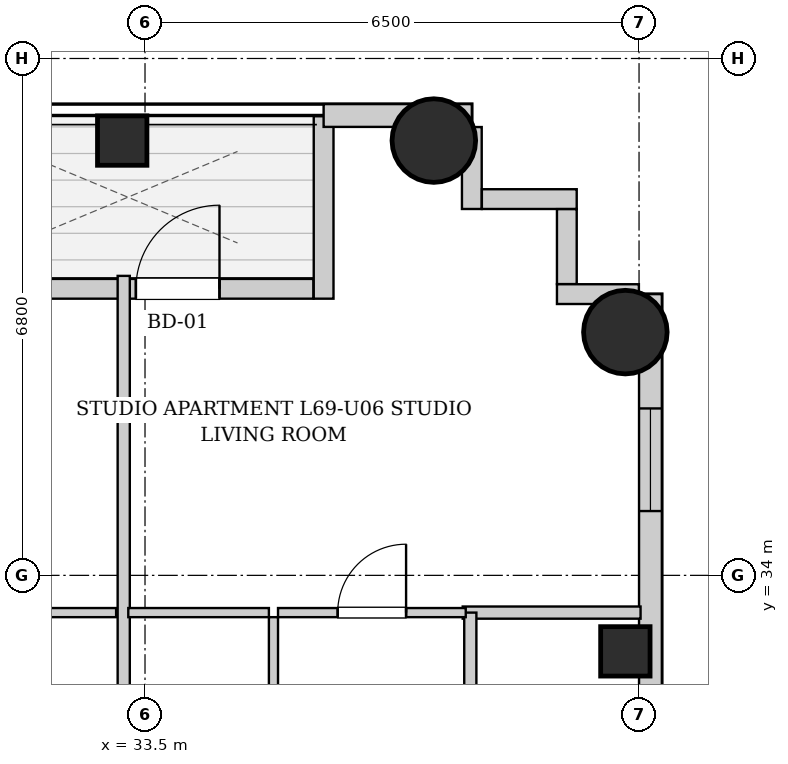
"""IFC4 building model, lengths in metres.
Left out: names, types, materials, properties, quantities, classifications, styles, units other than length and angle.
Written with IfcOpenShell. Run it as: python <this file> out.ifc"""

import sys

from ifc_helpers import new_model, si_unit, direction, frame, frame_2d, origin, origin_2d, place, context, subcontext, project, spatial, rectangle, circle, extrude, element, fill, save


model = new_model("IFC4")
c1 = context("Model", 3, precision=1e-05, world=origin(), true_north=direction((0.0, 1.0)))
c2 = subcontext(c1, "Body", "Model", "MODEL_VIEW")
j1 = project(units=[si_unit("LENGTHUNIT", "METRE"), si_unit("PLANEANGLEUNIT", "RADIAN")], contexts=[c1])
p1 = place(None, origin())
s1 = spatial("IfcSite", under=j1, at=p1, CompositionType="ELEMENT")
p2 = place(p1, origin())
s2 = spatial("IfcBuilding", under=s1, at=p2, CompositionType="ELEMENT")
p3 = place(p2, frame((0.0, 0.0, 237.7)))
s3 = spatial("IfcBuildingStorey", under=s2, at=p3, CompositionType="ELEMENT", Elevation=237.7)
p4 = place(p3, frame((33.2, 39.72, 0.0), z_axis=(0.0, 0.0, 1.0), x_axis=(1.0, 0.0, 0.0)))
e1 = element("IfcColumn", 1, at=p4, inside=s3, PredefinedType="COLUMN", context=c2, shape_type="SweptSolid", body=[
    extrude(rectangle(XDim=0.65, YDim=0.65, at=origin_2d()), origin(), (0.0, 0.0, 1.0), 3.4),
])
p5 = place(p3, frame((37.3, 39.72, 0.0), z_axis=(0.0, 0.0, 1.0), x_axis=(1.0, 0.0, 0.0)))
e2 = element("IfcColumn", 2, at=p5, inside=s3, PredefinedType="COLUMN", context=c2, shape_type="SweptSolid", body=[
    extrude(circle(Radius=0.55, at=origin_2d()), origin(), (0.0, 0.0, 1.0), 3.4),
])
p6 = place(p3, frame((39.82, 33.0, 0.0), z_axis=(0.0, 0.0, 1.0), x_axis=(1.0, 0.0, 0.0)))
e3 = element("IfcColumn", 3, at=p6, inside=s3, PredefinedType="COLUMN", context=c2, shape_type="SweptSolid", body=[
    extrude(rectangle(XDim=0.65, YDim=0.65, at=origin_2d()), origin(), (0.0, 0.0, 1.0), 3.4),
])
p7 = place(p3, frame((39.82, 37.2, 0.0), z_axis=(0.0, 0.0, 1.0), x_axis=(1.0, 0.0, 0.0)))
e4 = element("IfcColumn", 4, at=p7, inside=s3, PredefinedType="COLUMN", context=c2, shape_type="SweptSolid", body=[
    extrude(circle(Radius=0.55, at=origin_2d()), origin(), (0.0, 0.0, 1.0), 3.4),
])
p8 = place(p3, frame((30.834, 37.77, 0.0), z_axis=(0.0, 0.0, 1.0), x_axis=(1.0, 0.0, 0.0)))
e5 = element("IfcWall", 5, at=p8, inside=s3, PredefinedType="SOLIDWALL", context=c2, shape_type="SweptSolid", body=[
    extrude(rectangle(XDim=4.882, YDim=0.26, at=frame_2d((2.441, 0.0))), origin(), (0.0, 0.0, 1.0), 3.14),
])
p9 = place(p8, frame((2.546, 0.0, 0.0)))
e6 = element("IfcOpeningElement", 6, at=p9, cuts=e5, PredefinedType="OPENING", context=c2, shape_type="SweptSolid", body=[
    extrude(rectangle(XDim=1.1, YDim=2.0, at=frame_2d((0.55, 1.0))), frame((0.0, 0.14, 0.0), z_axis=(0.0, -1.0, 0.0), x_axis=(1.0, 0.0, 0.0)), (0.0, 0.0, 1.0), 0.28),
])
p10 = place(p3, frame((35.85, 37.64, 0.0), z_axis=(0.0, 0.0, 1.0), x_axis=(0.0, 1.0, 0.0)))
e7 = element("IfcWall", 7, at=p10, inside=s3, PredefinedType="SOLIDWALL", context=c2, shape_type="SweptSolid", body=[
    extrude(rectangle(XDim=2.4, YDim=0.26, at=frame_2d((1.2, 0.0))), origin(), (0.0, 0.0, 1.0), 3.14),
])
p11 = place(p3, frame((35.85, 40.05, 0.0), z_axis=(0.0, 0.0, 1.0), x_axis=(1.0, 0.0, 0.0)))
e8 = element("IfcWall", 8, at=p11, inside=s3, PredefinedType="SOLIDWALL", context=c2, shape_type="SweptSolid", body=[
    extrude(rectangle(XDim=1.95, YDim=0.3, at=frame_2d((0.975, 0.0))), origin(), (0.0, 0.0, 1.0), 3.14),
])
p12 = place(p3, frame((40.15, 37.7, 0.0), z_axis=(0.0, 0.0, 1.0), x_axis=(0.0, -1.0, 0.0)))
e9 = element("IfcWall", 9, at=p12, inside=s3, PredefinedType="SOLIDWALL", context=c2, shape_type="SweptSolid", body=[
    extrude(rectangle(XDim=31.4, YDim=0.3, at=frame_2d((15.7, 0.0))), origin(), (0.0, 0.0, 1.0), 3.14),
])
p13 = place(p12, frame((28.546, 0.0, 0.55)))
e10 = element("IfcOpeningElement", 10, at=p13, cuts=e9, PredefinedType="OPENING", context=c2, shape_type="SweptSolid", body=[
    extrude(rectangle(XDim=1.35, YDim=1.2, at=frame_2d((0.675, 0.6))), frame((0.0, 0.16, 0.0), z_axis=(0.0, -1.0, 0.0), x_axis=(1.0, 0.0, 0.0)), (0.0, 0.0, 1.0), 0.32),
])
p14 = place(p12, frame((1.504, 0.0, 0.55)))
e11 = element("IfcOpeningElement", 11, at=p14, cuts=e9, PredefinedType="OPENING", context=c2, shape_type="SweptSolid", body=[
    extrude(rectangle(XDim=1.35, YDim=1.2, at=frame_2d((0.675, 0.6))), frame((0.0, 0.16, 0.0), z_axis=(0.0, -1.0, 0.0), x_axis=(1.0, 0.0, 0.0)), (0.0, 0.0, 1.0), 0.32),
])
p15 = place(p12, frame((18.2, 0.0, 0.55)))
e12 = element("IfcOpeningElement", 12, at=p15, cuts=e9, PredefinedType="OPENING", context=c2, shape_type="SweptSolid", body=[
    extrude(rectangle(XDim=1.35, YDim=1.2, at=frame_2d((0.675, 0.6))), frame((0.0, 0.16, 0.0), z_axis=(0.0, -1.0, 0.0), x_axis=(1.0, 0.0, 0.0)), (0.0, 0.0, 1.0), 0.32),
])
p16 = place(p12, frame((19.81, 0.0, 0.55)))
e13 = element("IfcOpeningElement", 13, at=p16, cuts=e9, PredefinedType="OPENING", context=c2, shape_type="SweptSolid", body=[
    extrude(rectangle(XDim=1.35, YDim=1.2, at=frame_2d((0.675, 0.6))), frame((0.0, 0.16, 0.0), z_axis=(0.0, -1.0, 0.0), x_axis=(1.0, 0.0, 0.0)), (0.0, 0.0, 1.0), 0.32),
])
p17 = place(p12, frame((11.043, 0.0, 0.55)))
e14 = element("IfcOpeningElement", 14, at=p17, cuts=e9, PredefinedType="OPENING", context=c2, shape_type="SweptSolid", body=[
    extrude(rectangle(XDim=1.35, YDim=1.2, at=frame_2d((0.675, 0.6))), frame((0.0, 0.16, 0.0), z_axis=(0.0, -1.0, 0.0), x_axis=(1.0, 0.0, 0.0)), (0.0, 0.0, 1.0), 0.32),
])
p18 = place(p12, frame((9.185, 0.0, 0.55)))
e15 = element("IfcOpeningElement", 15, at=p18, cuts=e9, PredefinedType="OPENING", context=c2, shape_type="SweptSolid", body=[
    extrude(rectangle(XDim=1.35, YDim=1.2, at=frame_2d((0.675, 0.6))), frame((0.0, 0.16, 0.0), z_axis=(0.0, -1.0, 0.0), x_axis=(1.0, 0.0, 0.0)), (0.0, 0.0, 1.0), 0.32),
])
p19 = place(p3, frame((37.8, 39.898, 0.0), z_axis=(0.0, 0.0, 1.0), x_axis=(0.0, -1.0, 0.0)))
e16 = element("IfcWall", 16, at=p19, inside=s3, PredefinedType="SOLIDWALL", context=c2, shape_type="SweptSolid", body=[
    extrude(rectangle(XDim=1.078, YDim=0.26, at=frame_2d((0.539, 0.0))), origin(), (0.0, 0.0, 1.0), 3.14),
])
p20 = place(p3, frame((37.932, 38.95, 0.0), z_axis=(0.0, 0.0, 1.0), x_axis=(1.0, 0.0, 0.0)))
e17 = element("IfcWall", 17, at=p20, inside=s3, PredefinedType="SOLIDWALL", context=c2, shape_type="SweptSolid", body=[
    extrude(rectangle(XDim=1.248, YDim=0.26, at=frame_2d((0.624, 0.0))), origin(), (0.0, 0.0, 1.0), 3.14),
])
p21 = place(p3, frame((39.05, 38.818, 0.0), z_axis=(0.0, 0.0, 1.0), x_axis=(0.0, -1.0, 0.0)))
e18 = element("IfcWall", 18, at=p21, inside=s3, PredefinedType="SOLIDWALL", context=c2, shape_type="SweptSolid", body=[
    extrude(rectangle(XDim=0.986, YDim=0.26, at=frame_2d((0.493, 0.0))), origin(), (0.0, 0.0, 1.0), 3.14),
])
p22 = place(p3, frame((38.92, 37.7, 0.0), z_axis=(0.0, 0.0, 1.0), x_axis=(1.0, 0.0, 0.0)))
e19 = element("IfcWall", 19, at=p22, inside=s3, PredefinedType="SOLIDWALL", context=c2, shape_type="SweptSolid", body=[
    extrude(rectangle(XDim=1.078, YDim=0.26, at=frame_2d((0.539, 0.0))), origin(), (0.0, 0.0, 1.0), 3.14),
])
p23 = place(p3, frame((29.89, 33.51, 0.0), z_axis=(0.0, 0.0, 1.0), x_axis=(1.0, 0.0, 0.0)))
e20 = element("IfcWall", 20, at=p23, inside=s3, PredefinedType="PARTITIONING", context=c2, shape_type="SweptSolid", body=[
    extrude(rectangle(XDim=3.23, YDim=0.12, at=frame_2d((1.615, 0.0))), origin(), (0.0, 0.0, 1.0), 3.14),
])
p24 = place(p23, frame((1.165, 0.0, 0.0)))
e21 = element("IfcOpeningElement", 21, at=p24, cuts=e20, PredefinedType="OPENING", context=c2, shape_type="SweptSolid", body=[
    extrude(rectangle(XDim=0.9, YDim=2.05, at=frame_2d((0.45, 1.025))), frame((0.0, 0.07, 0.0), z_axis=(0.0, -1.0, 0.0), x_axis=(1.0, 0.0, 0.0)), (0.0, 0.0, 1.0), 0.14),
])
p25 = place(p3, frame((37.68, 33.51, 0.0), z_axis=(0.0, 0.0, 1.0), x_axis=(1.0, 0.0, 0.0)))
e22 = element("IfcWall", 22, at=p25, inside=s3, PredefinedType="PARTITIONING", context=c2, shape_type="SweptSolid", body=[
    extrude(rectangle(XDim=2.34, YDim=0.16, at=frame_2d((1.17, 0.0))), origin(), (0.0, 0.0, 1.0), 3.14),
])
p26 = place(p3, frame((37.78, 30.6, 0.0), z_axis=(0.0, 0.0, 1.0), x_axis=(0.0, 1.0, 0.0)))
e23 = element("IfcWall", 23, at=p26, inside=s3, PredefinedType="PARTITIONING", context=c2, shape_type="SweptSolid", body=[
    extrude(rectangle(XDim=2.91, YDim=0.16, at=frame_2d((1.455, 0.0))), origin(), (0.0, 0.0, 1.0), 3.14),
])
p27 = place(p3, frame((33.22, 30.6, 0.0), z_axis=(0.0, 0.0, 1.0), x_axis=(0.0, 1.0, 0.0)))
e24 = element("IfcWall", 24, at=p27, inside=s3, PredefinedType="PARTITIONING", context=c2, shape_type="SweptSolid", body=[
    extrude(rectangle(XDim=7.34, YDim=0.16, at=frame_2d((3.67, 0.0))), origin(), (0.0, 0.0, 1.0), 2.668),
])
p28 = place(p3, frame((35.19, 30.6, 0.0), z_axis=(0.0, 0.0, 1.0), x_axis=(0.0, 1.0, 0.0)))
e25 = element("IfcWall", 25, at=p28, inside=s3, PredefinedType="PARTITIONING", context=c2, shape_type="SweptSolid", body=[
    extrude(rectangle(XDim=2.85, YDim=0.12, at=frame_2d((1.425, 0.0))), origin(), (0.0, 0.0, 1.0), 3.14),
])
p29 = place(p28, frame((0.995, 0.0, 0.0)))
e26 = element("IfcOpeningElement", 26, at=p29, cuts=e25, PredefinedType="OPENING", context=c2, shape_type="SweptSolid", body=[
    extrude(rectangle(XDim=0.86, YDim=2.05, at=frame_2d((0.43, 1.025))), frame((0.0, 0.07, 0.0), z_axis=(0.0, -1.0, 0.0), x_axis=(1.0, 0.0, 0.0)), (0.0, 0.0, 1.0), 0.14),
])
p30 = place(p3, frame((33.28, 33.51, 0.0), z_axis=(0.0, 0.0, 1.0), x_axis=(1.0, 0.0, 0.0)))
e27 = element("IfcWall", 27, at=p30, inside=s3, PredefinedType="PARTITIONING", context=c2, shape_type="SweptSolid", body=[
    extrude(rectangle(XDim=1.85, YDim=0.12, at=frame_2d((0.925, 0.0))), origin(), (0.0, 0.0, 1.0), 3.14),
])
p31 = place(p3, frame((35.25, 33.51, 0.0), z_axis=(0.0, 0.0, 1.0), x_axis=(1.0, 0.0, 0.0)))
e28 = element("IfcWall", 28, at=p31, inside=s3, PredefinedType="PARTITIONING", context=c2, shape_type="SweptSolid", body=[
    extrude(rectangle(XDim=2.47, YDim=0.12, at=frame_2d((1.235, 0.0))), origin(), (0.0, 0.0, 1.0), 3.14),
])
p32 = place(p31, frame((0.785, 0.0, 0.0)))
e29 = element("IfcOpeningElement", 29, at=p32, cuts=e28, PredefinedType="OPENING", context=c2, shape_type="SweptSolid", body=[
    extrude(rectangle(XDim=0.9, YDim=2.05, at=frame_2d((0.45, 1.025))), frame((0.0, 0.07, 0.0), z_axis=(0.0, -1.0, 0.0), x_axis=(1.0, 0.0, 0.0)), (0.0, 0.0, 1.0), 0.14),
])
p33 = place(p32, origin())
e30 = element("IfcDoor", 30, at=p33, inside=s3, OperationType="SINGLE_SWING_RIGHT", PredefinedType="DOOR", context=c2, shape_type="SweptSolid", body=[
    extrude(rectangle(XDim=0.9, YDim=2.05, at=frame_2d((0.45, 1.025))), frame((0.0, 0.025, 0.0), z_axis=(0.0, -1.0, 0.0), x_axis=(1.0, 0.0, 0.0)), (0.0, 0.0, 1.0), 0.05),
])
fill(e29, e30)
p34 = place(p9, origin())
e31 = element("IfcDoor", 31, at=p34, inside=s3, OperationType="SINGLE_SWING_RIGHT", PredefinedType="DOOR", context=c2, shape_type="SweptSolid", body=[
    extrude(rectangle(XDim=1.1, YDim=2.0, at=frame_2d((0.55, 1.0))), frame((0.0, 0.025, 0.0), z_axis=(0.0, -1.0, 0.0), x_axis=(1.0, 0.0, 0.0)), (0.0, 0.0, 1.0), 0.05),
])
fill(e6, e31)
p35 = place(p14, origin())
e32 = element("IfcWindow", 32, at=p35, inside=s3, PartitioningType="SINGLE_PANEL", PredefinedType="WINDOW", context=c2, shape_type="SweptSolid", body=[
    extrude(rectangle(XDim=1.35, YDim=1.2, at=frame_2d((0.675, 0.6))), frame((0.0, 0.03, 0.0), z_axis=(0.0, -1.0, 0.0), x_axis=(1.0, 0.0, 0.0)), (0.0, 0.0, 1.0), 0.06),
])
fill(e11, e32)
save(model, sys.argv[1])
